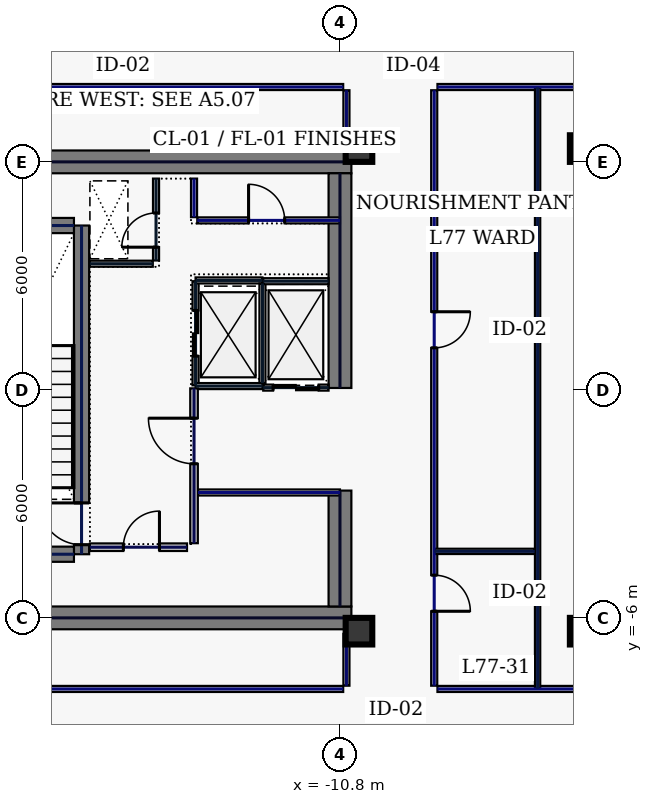
"""IFC4 building model, lengths in metres.
Left out: names, types, materials, properties, quantities, classifications, styles, units other than length and angle.
Written with IfcOpenShell. Run it as: python <this file> out.ifc"""

import sys

from ifc_helpers import new_model, si_unit, direction, frame, frame_2d, origin, origin_2d, place, context, subcontext, project, spatial, rectangle, hollow_rectangle, extrude, element, fill, save


model = new_model("IFC4")
c1 = context("Model", 3, precision=1e-05, world=origin(), true_north=direction((0.0, 1.0)))
c2 = subcontext(c1, "Body", "Model", "MODEL_VIEW")
j1 = project(units=[si_unit("LENGTHUNIT", "METRE"), si_unit("PLANEANGLEUNIT", "RADIAN")], contexts=[c1])
p1 = place(None, origin())
s1 = spatial("IfcSite", under=j1, at=p1, CompositionType="ELEMENT")
p2 = place(p1, origin())
s2 = spatial("IfcBuilding", under=s1, at=p2, CompositionType="ELEMENT")
p3 = place(p2, frame((0.0, 0.0, 329.0)))
s3 = spatial("IfcBuildingStorey", under=s2, at=p3, CompositionType="ELEMENT", Elevation=329.0)
for number, where, z_axis, x_axis in (
    (1, (-22.0, 6.0, 0.0), (0.0, 0.0, 1.0), (1.0, 0.0, 0.0)),
    (2, (-22.0, -6.0, 0.0), (0.0, 0.0, 1.0), (1.0, 0.0, 0.0)),
):
    element("IfcWall", number, at=place(p3, frame(where, z_axis=z_axis, x_axis=x_axis)), inside=s3, PredefinedType="SHEAR", context=c2, shape_type="SweptSolid", body=[
        extrude(rectangle(XDim=11.5, YDim=0.6, at=frame_2d((5.75, 0.0))), origin(), (0.0, 0.0, 1.0), 3.68),
    ])
p4 = place(p3, frame((-10.8, -5.7, 0.0), z_axis=(0.0, 0.0, 1.0), x_axis=(0.0, 1.0, 0.0)))
e3 = element("IfcWall", 3, at=p4, inside=s3, PredefinedType="SHEAR", context=c2, shape_type="SweptSolid", body=[
    extrude(rectangle(XDim=3.05, YDim=0.6, at=frame_2d((1.525, 0.0))), origin(), (0.0, 0.0, 1.0), 3.68),
])
p5 = place(p3, frame((-10.8, 0.05, 0.0), z_axis=(0.0, 0.0, 1.0), x_axis=(0.0, 1.0, 0.0)))
e4 = element("IfcWall", 4, at=p5, inside=s3, PredefinedType="SHEAR", context=c2, shape_type="SweptSolid", body=[
    extrude(rectangle(XDim=5.65, YDim=0.6, at=frame_2d((2.825, 0.0))), origin(), (0.0, 0.0, 1.0), 3.68),
])
p6 = place(p3, frame((-17.6, -4.325, 0.0), z_axis=(0.0, 0.0, 1.0), x_axis=(0.0, 1.0, 0.0)))
e5 = element("IfcWall", 5, at=p6, inside=s3, PredefinedType="SHEAR", context=c2, shape_type="SweptSolid", body=[
    extrude(rectangle(XDim=8.65, YDim=0.4, at=frame_2d((4.325, 0.0))), origin(), (0.0, 0.0, 1.0), 3.68),
])
p7 = place(p6, frame((0.25, 0.0, 0.0)))
e6 = element("IfcOpeningElement", 6, at=p7, cuts=e5, PredefinedType="OPENING", context=c2, shape_type="SweptSolid", body=[
    extrude(rectangle(XDim=1.1, YDim=2.2, at=frame_2d((0.55, 1.1))), frame((0.0, 0.21, 0.0), z_axis=(0.0, -1.0, 0.0), x_axis=(1.0, 0.0, 0.0)), (0.0, 0.0, 1.0), 0.42),
])
for number, where, z_axis, x_axis in (
    (7, (-21.2, -4.325, 0.0), (0.0, 0.0, 1.0), (1.0, 0.0, 0.0)),
    (8, (-21.2, 4.325, 0.0), (0.0, 0.0, 1.0), (1.0, 0.0, 0.0)),
):
    element("IfcWall", number, at=place(p3, frame(where, z_axis=z_axis, x_axis=x_axis)), inside=s3, PredefinedType="SHEAR", context=c2, shape_type="SweptSolid", body=[
        extrude(rectangle(XDim=3.4, YDim=0.4, at=frame_2d((1.7, 0.0))), origin(), (0.0, 0.0, 1.0), 3.68),
    ])
for number, where, z_axis, x_axis in (
    (9, (-10.3, -6.35, 0.0), (0.0, 0.0, 1.0), (1.0, 0.0, 0.0)),
    (10, (-10.3, 6.35, 0.0), (0.0, 0.0, 1.0), (1.0, 0.0, 0.0)),
    (11, (-4.4, -6.35, 0.0), (0.0, 0.0, 1.0), (1.0, 0.0, 0.0)),
    (12, (-4.4, 6.35, 0.0), (0.0, 0.0, 1.0), (1.0, 0.0, 0.0)),
):
    element("IfcColumn", number, at=place(p3, frame(where, z_axis=z_axis, x_axis=x_axis)), inside=s3, PredefinedType="COLUMN", context=c2, shape_type="SweptSolid", body=[
        extrude(hollow_rectangle(XDim=0.7, YDim=0.7, WallThickness=0.032, at=origin_2d()), origin(), (0.0, 0.0, 1.0), 3.68),
    ])
p8 = place(p3, frame((-14.6, 0.12, 0.0), z_axis=(0.0, 0.0, 1.0), x_axis=(0.0, 1.0, 0.0)))
e13 = element("IfcWall", 13, at=p8, inside=s3, PredefinedType="PARTITIONING", context=c2, shape_type="SweptSolid", body=[
    extrude(rectangle(XDim=2.74, YDim=0.16, at=frame_2d((1.37, 0.0))), origin(), (0.0, 0.0, 1.0), 3.68),
])
p9 = place(p8, frame((0.77, 0.0, 0.0)))
e14 = element("IfcOpeningElement", 14, at=p9, cuts=e13, PredefinedType="OPENING", context=c2, shape_type="SweptSolid", body=[
    extrude(rectangle(XDim=1.2, YDim=2.2, at=frame_2d((0.6, 1.1))), frame((0.0, 0.09, 0.0), z_axis=(0.0, -1.0, 0.0), x_axis=(1.0, 0.0, 0.0)), (0.0, 0.0, 1.0), 0.18),
])
for number, where, z_axis, x_axis in (
    (15, (-14.6, 0.1, 0.0), (0.0, 0.0, 1.0), (1.0, 0.0, 0.0)),
    (16, (-14.6, 2.88, 0.0), (0.0, 0.0, 1.0), (1.0, 0.0, 0.0)),
):
    element("IfcWall", number, at=place(p3, frame(where, z_axis=z_axis, x_axis=x_axis)), inside=s3, PredefinedType="PARTITIONING", context=c2, shape_type="SweptSolid", body=[
        extrude(rectangle(XDim=1.76, YDim=0.16, at=frame_2d((0.88, 0.0))), origin(), (0.0, 0.0, 1.0), 3.68),
    ])
p10 = place(p3, frame((-12.84, 0.18, 0.0), z_axis=(0.0, 0.0, 1.0), x_axis=(0.0, 1.0, 0.0)))
e17 = element("IfcWall", 17, at=p10, inside=s3, PredefinedType="PARTITIONING", context=c2, shape_type="SweptSolid", body=[
    extrude(rectangle(XDim=2.62, YDim=0.16, at=frame_2d((1.31, 0.0))), origin(), (0.0, 0.0, 1.0), 3.68),
])
p11 = place(p3, frame((-12.82, 0.06, 0.0), z_axis=(0.0, 0.0, 1.0), x_axis=(1.0, 0.0, 0.0)))
e18 = element("IfcWall", 18, at=p11, inside=s3, PredefinedType="PARTITIONING", context=c2, shape_type="SweptSolid", body=[
    extrude(rectangle(XDim=1.72, YDim=0.16, at=frame_2d((0.86, 0.0))), origin(), (0.0, 0.0, 1.0), 3.68),
])
p12 = place(p11, frame((0.26, 0.0, 0.0)))
e19 = element("IfcOpeningElement", 19, at=p12, cuts=e18, PredefinedType="OPENING", context=c2, shape_type="SweptSolid", body=[
    extrude(rectangle(XDim=1.2, YDim=2.2, at=frame_2d((0.6, 1.1))), frame((0.0, 0.09, 0.0), z_axis=(0.0, -1.0, 0.0), x_axis=(1.0, 0.0, 0.0)), (0.0, 0.0, 1.0), 0.18),
])
p13 = place(p3, frame((-12.82, 2.86, 0.0), z_axis=(0.0, 0.0, 1.0), x_axis=(1.0, 0.0, 0.0)))
e20 = element("IfcWall", 20, at=p13, inside=s3, PredefinedType="PARTITIONING", context=c2, shape_type="SweptSolid", body=[
    extrude(rectangle(XDim=1.72, YDim=0.16, at=frame_2d((0.86, 0.0))), origin(), (0.0, 0.0, 1.0), 3.68),
])
p14 = place(p3, frame((-15.64, 3.405, 0.0), z_axis=(0.0, 0.0, 1.0), x_axis=(0.0, 1.0, 0.0)))
e21 = element("IfcWall", 21, at=p14, inside=s3, PredefinedType="PARTITIONING", context=c2, shape_type="SweptSolid", body=[
    extrude(rectangle(XDim=2.155, YDim=0.16, at=frame_2d((1.078, 0.0))), origin(), (0.0, 0.0, 1.0), 3.68),
])
p15 = place(p14, frame((0.35, 0.0, 0.0)))
e22 = element("IfcOpeningElement", 22, at=p15, cuts=e21, PredefinedType="OPENING", context=c2, shape_type="SweptSolid", body=[
    extrude(rectangle(XDim=0.9, YDim=2.2, at=frame_2d((0.45, 1.1))), frame((0.0, 0.09, 0.0), z_axis=(0.0, -1.0, 0.0), x_axis=(1.0, 0.0, 0.0)), (0.0, 0.0, 1.0), 0.18),
])
p16 = place(p3, frame((-17.38, 3.32, 0.0), z_axis=(0.0, 0.0, 1.0), x_axis=(1.0, 0.0, 0.0)))
e23 = element("IfcWall", 23, at=p16, inside=s3, PredefinedType="PARTITIONING", context=c2, shape_type="SweptSolid", body=[
    extrude(rectangle(XDim=1.655, YDim=0.16, at=frame_2d((0.827, 0.0))), origin(), (0.0, 0.0, 1.0), 3.68),
])
p17 = place(p3, frame((-17.38, -4.14, 0.0), z_axis=(0.0, 0.0, 1.0), x_axis=(1.0, 0.0, 0.0)))
e24 = element("IfcWall", 24, at=p17, inside=s3, PredefinedType="SOLIDWALL", context=c2, shape_type="SweptSolid", body=[
    extrude(rectangle(XDim=2.555, YDim=0.2, at=frame_2d((1.277, 0.0))), origin(), (0.0, 0.0, 1.0), 3.68),
])
p18 = place(p17, frame((0.88, 0.0, 0.0)))
e25 = element("IfcOpeningElement", 25, at=p18, cuts=e24, PredefinedType="OPENING", context=c2, shape_type="SweptSolid", body=[
    extrude(rectangle(XDim=0.95, YDim=2.2, at=frame_2d((0.475, 1.1))), frame((0.0, 0.11, 0.0), z_axis=(0.0, -1.0, 0.0), x_axis=(1.0, 0.0, 0.0)), (0.0, 0.0, 1.0), 0.22),
])
p19 = place(p3, frame((-14.535, -2.7, 0.0), z_axis=(0.0, 0.0, 1.0), x_axis=(1.0, 0.0, 0.0)))
e26 = element("IfcWall", 26, at=p19, inside=s3, PredefinedType="PARTITIONING", context=c2, shape_type="SweptSolid", body=[
    extrude(rectangle(XDim=3.735, YDim=0.16, at=frame_2d((1.867, 0.0))), origin(), (0.0, 0.0, 1.0), 3.68),
])
p20 = place(p3, frame((-14.555, 4.46, 0.0), z_axis=(0.0, 0.0, 1.0), x_axis=(1.0, 0.0, 0.0)))
e27 = element("IfcWall", 27, at=p20, inside=s3, PredefinedType="PARTITIONING", context=c2, shape_type="SweptSolid", body=[
    extrude(rectangle(XDim=3.755, YDim=0.16, at=frame_2d((1.877, 0.0))), origin(), (0.0, 0.0, 1.0), 3.68),
])
p21 = place(p20, frame((1.35, 0.0, 0.0)))
e28 = element("IfcOpeningElement", 28, at=p21, cuts=e27, PredefinedType="OPENING", context=c2, shape_type="SweptSolid", body=[
    extrude(rectangle(XDim=0.95, YDim=2.2, at=frame_2d((0.475, 1.1))), frame((0.0, 0.09, 0.0), z_axis=(0.0, -1.0, 0.0), x_axis=(1.0, 0.0, 0.0)), (0.0, 0.0, 1.0), 0.18),
])
p22 = place(p3, frame((-14.64, 4.545, 0.0), z_axis=(0.0, 0.0, 1.0), x_axis=(0.0, 1.0, 0.0)))
e29 = element("IfcWall", 29, at=p22, inside=s3, PredefinedType="PARTITIONING", context=c2, shape_type="SweptSolid", body=[
    extrude(rectangle(XDim=1.015, YDim=0.16, at=frame_2d((0.508, 0.0))), origin(), (0.0, 0.0, 1.0), 3.68),
])
p23 = place(p3, frame((-14.64, -4.035, 0.0), z_axis=(0.0, 0.0, 1.0), x_axis=(0.0, 1.0, 0.0)))
e30 = element("IfcWall", 30, at=p23, inside=s3, PredefinedType="SOLIDWALL", context=c2, shape_type="SweptSolid", body=[
    extrude(rectangle(XDim=4.075, YDim=0.2, at=frame_2d((2.038, 0.0))), origin(), (0.0, 0.0, 1.0), 3.68),
])
p24 = place(p23, frame((2.09, 0.0, 0.0)))
e31 = element("IfcOpeningElement", 31, at=p24, cuts=e30, PredefinedType="OPENING", context=c2, shape_type="SweptSolid", body=[
    extrude(rectangle(XDim=1.2, YDim=2.2, at=frame_2d((0.6, 1.1))), frame((0.0, 0.11, 0.0), z_axis=(0.0, -1.0, 0.0), x_axis=(1.0, 0.0, 0.0)), (0.0, 0.0, 1.0), 0.22),
])
p25 = place(p3, frame((-3.965, 7.97, 0.0), z_axis=(0.0, 0.0, 1.0), x_axis=(-1.0, 0.0, 0.0)))
e32 = element("IfcWall", 32, at=p25, inside=s3, PredefinedType="PARTITIONING", context=c2, shape_type="SweptSolid", body=[
    extrude(rectangle(XDim=4.27, YDim=0.16, at=frame_2d((2.135, 0.0))), origin(), (0.0, 0.0, 1.0), 3.68),
])
p26 = place(p3, frame((-8.32, 7.885, 0.0), z_axis=(0.0, 0.0, 1.0), x_axis=(0.0, -1.0, 0.0)))
e33 = element("IfcWall", 33, at=p26, inside=s3, PredefinedType="PARTITIONING", context=c2, shape_type="SweptSolid", body=[
    extrude(rectangle(XDim=15.67, YDim=0.16, at=frame_2d((7.835, 0.0))), origin(), (0.0, 0.0, 1.0), 3.68),
])
p27 = place(p26, frame((12.761, 0.0, 0.0)))
e34 = element("IfcOpeningElement", 34, at=p27, cuts=e33, PredefinedType="OPENING", context=c2, shape_type="SweptSolid", body=[
    extrude(rectangle(XDim=0.95, YDim=2.2, at=frame_2d((0.475, 1.1))), frame((0.0, 0.09, 0.0), z_axis=(0.0, -1.0, 0.0), x_axis=(1.0, 0.0, 0.0)), (0.0, 0.0, 1.0), 0.18),
])
p28 = place(p26, frame((5.829, 0.0, 0.0)))
e35 = element("IfcOpeningElement", 35, at=p28, cuts=e33, PredefinedType="OPENING", context=c2, shape_type="SweptSolid", body=[
    extrude(rectangle(XDim=0.95, YDim=2.2, at=frame_2d((0.475, 1.1))), frame((0.0, 0.09, 0.0), z_axis=(0.0, -1.0, 0.0), x_axis=(1.0, 0.0, 0.0)), (0.0, 0.0, 1.0), 0.18),
])
p29 = place(p3, frame((-8.235, -7.87, 0.0), z_axis=(0.0, 0.0, 1.0), x_axis=(1.0, 0.0, 0.0)))
e36 = element("IfcWall", 36, at=p29, inside=s3, PredefinedType="PARTITIONING", context=c2, shape_type="SweptSolid", body=[
    extrude(rectangle(XDim=4.27, YDim=0.16, at=frame_2d((2.135, 0.0))), origin(), (0.0, 0.0, 1.0), 3.68),
])
p30 = place(p3, frame((-10.63, -7.785, 0.0), z_axis=(0.0, 0.0, 1.0), x_axis=(0.0, 1.0, 0.0)))
e37 = element("IfcWall", 37, at=p30, inside=s3, PredefinedType="PARTITIONING", context=c2, shape_type="SweptSolid", body=[
    extrude(rectangle(XDim=1.365, YDim=0.16, at=frame_2d((0.683, 0.0))), origin(), (0.0, 0.0, 1.0), 2.075),
])
p31 = place(p3, frame((-10.63, 6.42, 0.0), z_axis=(0.0, 0.0, 1.0), x_axis=(0.0, 1.0, 0.0)))
e38 = element("IfcWall", 38, at=p31, inside=s3, PredefinedType="PARTITIONING", context=c2, shape_type="SweptSolid", body=[
    extrude(rectangle(XDim=1.465, YDim=0.16, at=frame_2d((0.732, 0.0))), origin(), (0.0, 0.0, 1.0), 2.075),
])
for number, where, z_axis, x_axis in (
    (39, (-10.715, 7.97, 0.0), (0.0, 0.0, 1.0), (-1.0, 0.0, 0.0)),
    (40, (-21.915, -7.87, 0.0), (0.0, 0.0, 1.0), (1.0, 0.0, 0.0)),
):
    element("IfcWall", number, at=place(p3, frame(where, z_axis=z_axis, x_axis=x_axis)), inside=s3, PredefinedType="PARTITIONING", context=c2, shape_type="SweptSolid", body=[
        extrude(rectangle(XDim=11.2, YDim=0.16, at=frame_2d((5.6, 0.0))), origin(), (0.0, 0.0, 1.0), 3.68),
    ])
p32 = place(p3, frame((-5.6, -7.865, 0.0), z_axis=(0.0, 0.0, 1.0), x_axis=(0.0, 1.0, 0.0)))
e41 = element("IfcWall", 41, at=p32, inside=s3, PredefinedType="PARTITIONING", context=c2, shape_type="SweptSolid", body=[
    extrude(rectangle(XDim=15.83, YDim=0.14, at=frame_2d((7.915, 0.0))), origin(), (0.0, 0.0, 1.0), 3.68),
])
p33 = place(p3, frame((-8.315, -4.25, 0.0), z_axis=(0.0, 0.0, 1.0), x_axis=(1.0, 0.0, 0.0)))
e42 = element("IfcWall", 42, at=p33, inside=s3, PredefinedType="PARTITIONING", context=c2, shape_type="SweptSolid", body=[
    extrude(rectangle(XDim=2.64, YDim=0.14, at=frame_2d((1.32, 0.0))), origin(), (0.0, 0.0, 1.0), 3.68),
])
p34 = place(p7, origin())
e43 = element("IfcDoor", 43, at=p34, inside=s3, OperationType="SINGLE_SWING_RIGHT", PredefinedType="DOOR", context=c2, shape_type="SweptSolid", body=[
    extrude(rectangle(XDim=1.1, YDim=2.2, at=frame_2d((0.55, 1.1))), frame((0.0, 0.025, 0.0), z_axis=(0.0, -1.0, 0.0), x_axis=(1.0, 0.0, 0.0)), (0.0, 0.0, 1.0), 0.05),
])
fill(e6, e43)
p35 = place(p9, origin())
e44 = element("IfcDoor", 44, at=p35, inside=s3, OperationType="SLIDING_TO_LEFT", PredefinedType="DOOR", context=c2, shape_type="SweptSolid", body=[
    extrude(rectangle(XDim=1.2, YDim=2.2, at=frame_2d((0.6, 1.1))), frame((0.0, 0.025, 0.0), z_axis=(0.0, -1.0, 0.0), x_axis=(1.0, 0.0, 0.0)), (0.0, 0.0, 1.0), 0.05),
])
fill(e14, e44)
p36 = place(p12, origin())
e45 = element("IfcDoor", 45, at=p36, inside=s3, OperationType="SLIDING_TO_LEFT", PredefinedType="DOOR", context=c2, shape_type="SweptSolid", body=[
    extrude(rectangle(XDim=1.2, YDim=2.2, at=frame_2d((0.6, 1.1))), frame((0.0, 0.025, 0.0), z_axis=(0.0, -1.0, 0.0), x_axis=(1.0, 0.0, 0.0)), (0.0, 0.0, 1.0), 0.05),
])
fill(e19, e45)
p37 = place(p15, origin())
e46 = element("IfcDoor", 46, at=p37, inside=s3, OperationType="SINGLE_SWING_LEFT", PredefinedType="DOOR", context=c2, shape_type="SweptSolid", body=[
    extrude(rectangle(XDim=0.9, YDim=2.2, at=frame_2d((0.45, 1.1))), frame((0.0, 0.025, 0.0), z_axis=(0.0, -1.0, 0.0), x_axis=(1.0, 0.0, 0.0)), (0.0, 0.0, 1.0), 0.05),
])
fill(e22, e46)
p38 = place(p18, origin())
e47 = element("IfcDoor", 47, at=p38, inside=s3, OperationType="SINGLE_SWING_RIGHT", PredefinedType="DOOR", context=c2, shape_type="SweptSolid", body=[
    extrude(rectangle(XDim=0.95, YDim=2.2, at=frame_2d((0.475, 1.1))), frame((0.0, 0.025, 0.0), z_axis=(0.0, -1.0, 0.0), x_axis=(1.0, 0.0, 0.0)), (0.0, 0.0, 1.0), 0.05),
])
fill(e25, e47)
p39 = place(p21, origin())
e48 = element("IfcDoor", 48, at=p39, inside=s3, OperationType="SINGLE_SWING_LEFT", PredefinedType="DOOR", context=c2, shape_type="SweptSolid", body=[
    extrude(rectangle(XDim=0.95, YDim=2.2, at=frame_2d((0.475, 1.1))), frame((0.0, 0.025, 0.0), z_axis=(0.0, -1.0, 0.0), x_axis=(1.0, 0.0, 0.0)), (0.0, 0.0, 1.0), 0.05),
])
fill(e28, e48)
p40 = place(p24, origin())
e49 = element("IfcDoor", 49, at=p40, inside=s3, OperationType="SINGLE_SWING_RIGHT", PredefinedType="DOOR", context=c2, shape_type="SweptSolid", body=[
    extrude(rectangle(XDim=1.2, YDim=2.2, at=frame_2d((0.6, 1.1))), frame((0.0, 0.025, 0.0), z_axis=(0.0, -1.0, 0.0), x_axis=(1.0, 0.0, 0.0)), (0.0, 0.0, 1.0), 0.05),
])
fill(e31, e49)
p41 = place(p27, origin())
e50 = element("IfcDoor", 50, at=p41, inside=s3, OperationType="SINGLE_SWING_RIGHT", PredefinedType="DOOR", context=c2, shape_type="SweptSolid", body=[
    extrude(rectangle(XDim=0.95, YDim=2.2, at=frame_2d((0.475, 1.1))), frame((0.0, 0.025, 0.0), z_axis=(0.0, -1.0, 0.0), x_axis=(1.0, 0.0, 0.0)), (0.0, 0.0, 1.0), 0.05),
])
fill(e34, e50)
p42 = place(p28, origin())
e51 = element("IfcDoor", 51, at=p42, inside=s3, OperationType="SINGLE_SWING_LEFT", PredefinedType="DOOR", context=c2, shape_type="SweptSolid", body=[
    extrude(rectangle(XDim=0.95, YDim=2.2, at=frame_2d((0.475, 1.1))), frame((0.0, 0.025, 0.0), z_axis=(0.0, -1.0, 0.0), x_axis=(1.0, 0.0, 0.0)), (0.0, 0.0, 1.0), 0.05),
])
fill(e35, e51)
save(model, sys.argv[1])
